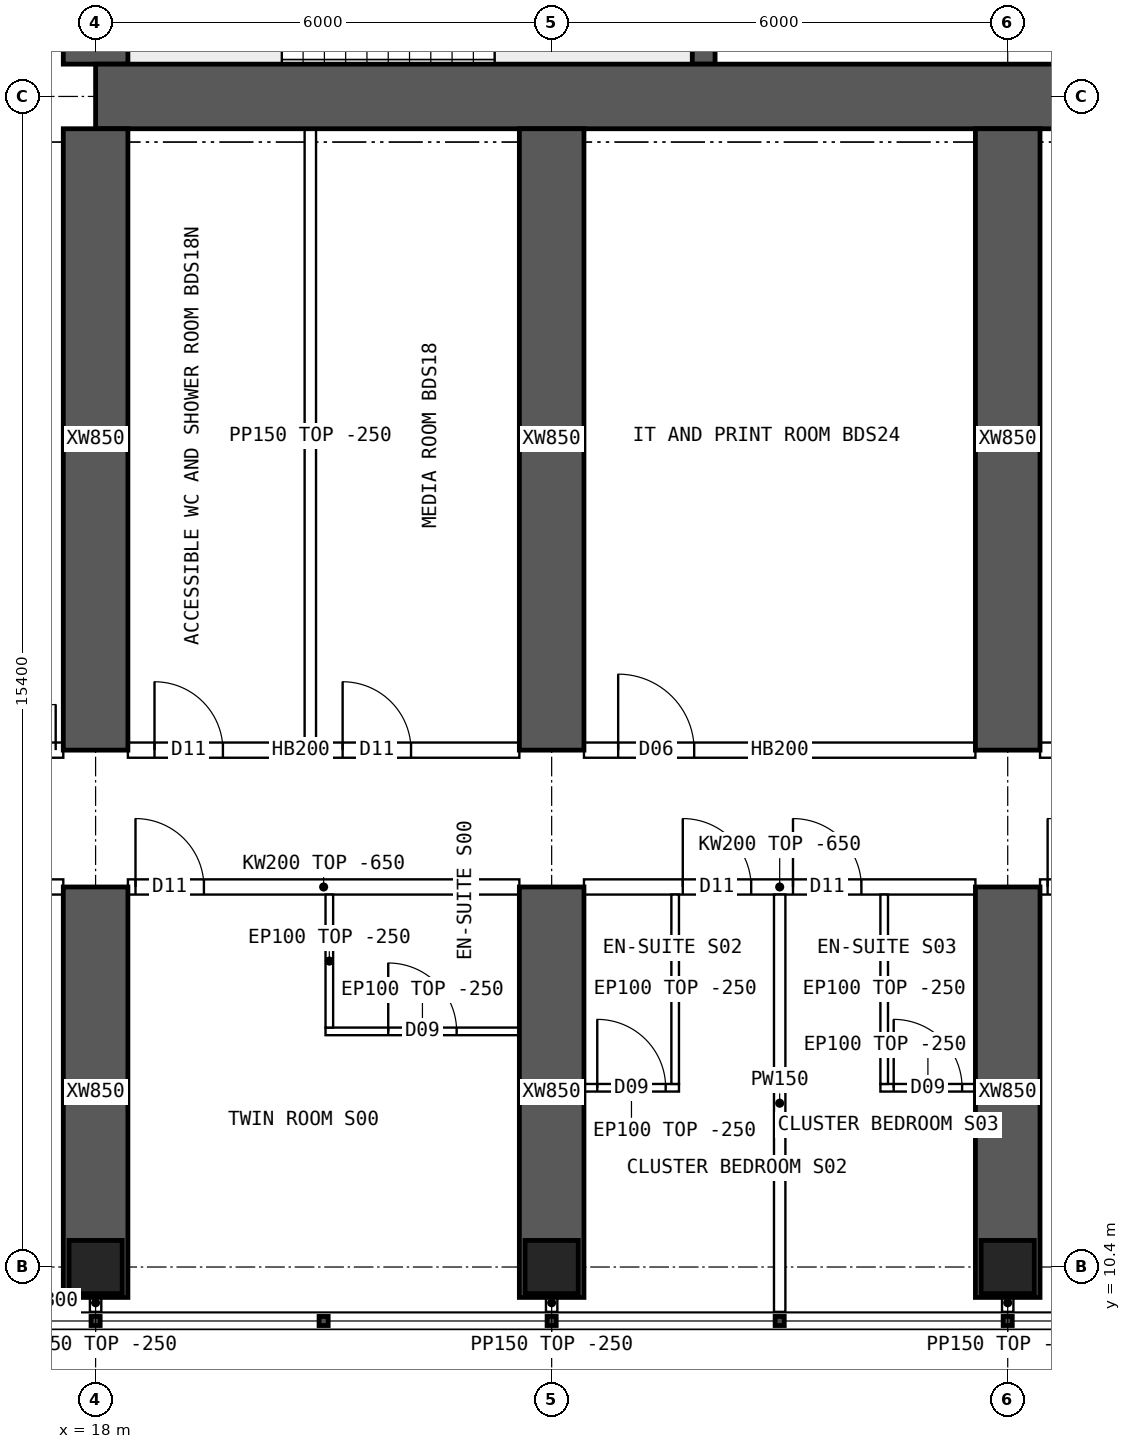
"""IFC4 building model, lengths in metres.
Left out: names, types, materials, properties, quantities, classifications, styles, units other than length and angle.
Written with IfcOpenShell. Run it as: python <this file> out.ifc"""

import sys

from ifc_helpers import new_model, si_unit, direction, frame, frame_2d, origin, origin_2d, place, context, subcontext, project, spatial, polyline, rectangle, hollow_rectangle, outline, extrude, element, fill, save


model = new_model("IFC4")
c1 = context("Model", 3, precision=1e-05, world=origin(), true_north=direction((0.0, 1.0)))
c2 = subcontext(c1, "Body", "Model", "MODEL_VIEW")
j1 = project(units=[si_unit("LENGTHUNIT", "METRE"), si_unit("PLANEANGLEUNIT", "RADIAN")], contexts=[c1])
p1 = place(None, origin())
s1 = spatial("IfcSite", under=j1, at=p1, CompositionType="ELEMENT")
p2 = place(p1, origin())
s2 = spatial("IfcBuilding", under=s1, at=p2, CompositionType="ELEMENT")
p3 = place(p2, frame((0.0, 0.0, 193.6)))
s3 = spatial("IfcBuildingStorey", under=s2, at=p3, CompositionType="ELEMENT", Elevation=193.6)
for number, where, z_axis, x_axis in (
    (1, (18.0, 10.4, 0.0), (0.0, 0.0, 1.0), (1.0, 0.0, 0.0)),
    (2, (24.0, 10.4, 0.0), (0.0, 0.0, 1.0), (1.0, 0.0, 0.0)),
    (3, (30.0, 10.4, 0.0), (0.0, 0.0, 1.0), (1.0, 0.0, 0.0)),
):
    element("IfcColumn", number, at=place(p3, frame(where, z_axis=z_axis, x_axis=x_axis)), inside=s3, PredefinedType="COLUMN", context=c2, shape_type="SweptSolid", body=[
        extrude(hollow_rectangle(XDim=0.7, YDim=0.7, WallThickness=0.07, at=origin_2d()), origin(), (0.0, 0.0, 1.0), 3.75),
    ])
p4 = place(p3, frame((18.0, 25.8, 0.0), z_axis=(0.0, 0.0, 1.0), x_axis=(1.0, 0.0, 0.0)))
e4 = element("IfcWall", 4, at=p4, inside=s3, PredefinedType="SHEAR", context=c2, shape_type="SweptSolid", body=[
    extrude(rectangle(XDim=48.0, YDim=0.85, at=frame_2d((24.0, 0.0))), origin(), (0.0, 0.0, 1.0), 3.75),
])
p5 = place(p3, frame((18.0, 26.225, 0.0), z_axis=(0.0, 0.0, 1.0), x_axis=(0.0, 1.0, 0.0)))
e5 = element("IfcWall", 5, at=p5, inside=s3, PredefinedType="SHEAR", context=c2, shape_type="SweptSolid", body=[
    extrude(rectangle(XDim=11.55, YDim=0.85, at=frame_2d((5.775, 0.0))), origin(), (0.0, 0.0, 1.0), 3.75),
])
p6 = place(p5, frame((5.075, 0.0, 0.0)))
e6 = element("IfcOpeningElement", 6, at=p6, cuts=e5, PredefinedType="OPENING", context=c2, shape_type="SweptSolid", body=[
    extrude(rectangle(XDim=1.2, YDim=2.1, at=frame_2d((0.6, 1.05))), frame((0.0, 0.435, 0.0), z_axis=(0.0, -1.0, 0.0), x_axis=(1.0, 0.0, 0.0)), (0.0, 0.0, 1.0), 0.87),
])
p7 = place(p3, frame((26.0, 26.225, 0.0), z_axis=(0.0, 0.0, 1.0), x_axis=(0.0, 1.0, 0.0)))
e7 = element("IfcWall", 7, at=p7, inside=s3, PredefinedType="SHEAR", context=c2, shape_type="SweptSolid", body=[
    extrude(rectangle(XDim=4.025, YDim=0.3, at=frame_2d((2.012, 0.0))), origin(), (0.0, 0.0, 1.0), 3.75),
])
p8 = place(p3, frame((18.0, 10.0, 0.0), z_axis=(0.0, 0.0, 1.0), x_axis=(0.0, 1.0, 0.0)))
e8 = element("IfcWall", 8, at=p8, inside=s3, PredefinedType="SHEAR", context=c2, shape_type="SweptSolid", body=[
    extrude(rectangle(XDim=5.4, YDim=0.85, at=frame_2d((2.7, 0.0))), origin(), (0.0, 0.0, 1.0), 3.75),
])
p9 = place(p3, frame((18.0, 17.2, 0.0), z_axis=(0.0, 0.0, 1.0), x_axis=(0.0, 1.0, 0.0)))
e9 = element("IfcWall", 9, at=p9, inside=s3, PredefinedType="SHEAR", context=c2, shape_type="SweptSolid", body=[
    extrude(rectangle(XDim=8.175, YDim=0.85, at=frame_2d((4.087, 0.0))), origin(), (0.0, 0.0, 1.0), 3.75),
])
p10 = place(p3, frame((24.0, 10.0, 0.0), z_axis=(0.0, 0.0, 1.0), x_axis=(0.0, 1.0, 0.0)))
e10 = element("IfcWall", 10, at=p10, inside=s3, PredefinedType="SHEAR", context=c2, shape_type="SweptSolid", body=[
    extrude(rectangle(XDim=5.4, YDim=0.85, at=frame_2d((2.7, 0.0))), origin(), (0.0, 0.0, 1.0), 3.75),
])
p11 = place(p3, frame((24.0, 17.2, 0.0), z_axis=(0.0, 0.0, 1.0), x_axis=(0.0, 1.0, 0.0)))
e11 = element("IfcWall", 11, at=p11, inside=s3, PredefinedType="SHEAR", context=c2, shape_type="SweptSolid", body=[
    extrude(rectangle(XDim=8.175, YDim=0.85, at=frame_2d((4.087, 0.0))), origin(), (0.0, 0.0, 1.0), 3.75),
])
p12 = place(p3, frame((30.0, 10.0, 0.0), z_axis=(0.0, 0.0, 1.0), x_axis=(0.0, 1.0, 0.0)))
e12 = element("IfcWall", 12, at=p12, inside=s3, PredefinedType="SHEAR", context=c2, shape_type="SweptSolid", body=[
    extrude(rectangle(XDim=5.4, YDim=0.85, at=frame_2d((2.7, 0.0))), origin(), (0.0, 0.0, 1.0), 3.75),
])
p13 = place(p3, frame((30.0, 17.2, 0.0), z_axis=(0.0, 0.0, 1.0), x_axis=(0.0, 1.0, 0.0)))
e13 = element("IfcWall", 13, at=p13, inside=s3, PredefinedType="SHEAR", context=c2, shape_type="SweptSolid", body=[
    extrude(rectangle(XDim=8.175, YDim=0.85, at=frame_2d((4.087, 0.0))), origin(), (0.0, 0.0, 1.0), 3.75),
])
p14 = place(p3, frame((17.2, 9.95, 0.0), z_axis=(0.0, 0.0, 1.0), x_axis=(1.0, 0.0, 0.0)))
e14 = element("IfcWall", 14, at=p14, inside=s3, PredefinedType="SOLIDWALL", context=c2, shape_type="SweptSolid", body=[
    extrude(rectangle(XDim=0.375, YDim=0.3, at=frame_2d((0.188, 0.0))), origin(), (0.0, 0.0, 1.0), 3.5),
])
p15 = place(p3, frame((15.6, 15.4, 0.0), z_axis=(0.0, 0.0, 1.0), x_axis=(1.0, 0.0, 0.0)))
e15 = element("IfcWall", 15, at=p15, inside=s3, PredefinedType="SOLIDWALL", context=c2, shape_type="SweptSolid", body=[
    extrude(rectangle(XDim=1.975, YDim=0.2, at=frame_2d((0.987, 0.0))), origin(), (0.0, 0.0, 1.0), 3.5),
])
p16 = place(p15, frame((0.875, 0.0, 0.0)))
e16 = element("IfcOpeningElement", 16, at=p16, cuts=e15, PredefinedType="OPENING", context=c2, shape_type="SweptSolid", body=[
    extrude(rectangle(XDim=0.9, YDim=2.1, at=frame_2d((0.45, 1.05))), frame((0.0, 0.11, 0.0), z_axis=(0.0, -1.0, 0.0), x_axis=(1.0, 0.0, 0.0)), (0.0, 0.0, 1.0), 0.22),
])
p17 = place(p3, frame((15.6, 17.2, 0.0), z_axis=(0.0, 0.0, 1.0), x_axis=(1.0, 0.0, 0.0)))
e17 = element("IfcWall", 17, at=p17, inside=s3, PredefinedType="SOLIDWALL", context=c2, shape_type="SweptSolid", body=[
    extrude(rectangle(XDim=1.975, YDim=0.2, at=frame_2d((0.987, 0.0))), origin(), (0.0, 0.0, 1.0), 3.5),
])
p18 = place(p17, frame((0.675, 0.0, 0.0)))
e18 = element("IfcOpeningElement", 18, at=p18, cuts=e17, PredefinedType="OPENING", context=c2, shape_type="SweptSolid", body=[
    extrude(rectangle(XDim=1.2, YDim=2.1, at=frame_2d((0.6, 1.05))), frame((0.0, 0.11, 0.0), z_axis=(0.0, -1.0, 0.0), x_axis=(1.0, 0.0, 0.0)), (0.0, 0.0, 1.0), 0.22),
])
p19 = place(p3, frame((18.425, 15.4, 0.0), z_axis=(0.0, 0.0, 1.0), x_axis=(1.0, 0.0, 0.0)))
e19 = element("IfcWall", 19, at=p19, inside=s3, PredefinedType="SOLIDWALL", context=c2, shape_type="SweptSolid", body=[
    extrude(outline(polyline([(0.0, 0.0), (5.15, 0.0), (5.15, 3.1), (0.0, 3.1), (0.0, 0.0)])), frame((0.0, 0.1, 0.0), z_axis=(0.0, -1.0, 0.0), x_axis=(1.0, 0.0, 0.0)), (0.0, 0.0, 1.0), 0.2),
])
p20 = place(p19, frame((0.1, 0.0, 0.0)))
e20 = element("IfcOpeningElement", 20, at=p20, cuts=e19, PredefinedType="OPENING", context=c2, shape_type="SweptSolid", body=[
    extrude(rectangle(XDim=0.9, YDim=2.1, at=frame_2d((0.45, 1.05))), frame((0.0, 0.11, 0.0), z_axis=(0.0, -1.0, 0.0), x_axis=(1.0, 0.0, 0.0)), (0.0, 0.0, 1.0), 0.22),
])
p21 = place(p3, frame((18.425, 17.2, 0.0), z_axis=(0.0, 0.0, 1.0), x_axis=(1.0, 0.0, 0.0)))
e21 = element("IfcWall", 21, at=p21, inside=s3, PredefinedType="SOLIDWALL", context=c2, shape_type="SweptSolid", body=[
    extrude(rectangle(XDim=5.15, YDim=0.2, at=frame_2d((2.575, 0.0))), origin(), (0.0, 0.0, 1.0), 3.5),
])
p22 = place(p21, frame((0.35, 0.0, 0.0)))
e22 = element("IfcOpeningElement", 22, at=p22, cuts=e21, PredefinedType="OPENING", context=c2, shape_type="SweptSolid", body=[
    extrude(rectangle(XDim=0.9, YDim=2.1, at=frame_2d((0.45, 1.05))), frame((0.0, 0.11, 0.0), z_axis=(0.0, -1.0, 0.0), x_axis=(1.0, 0.0, 0.0)), (0.0, 0.0, 1.0), 0.22),
])
p23 = place(p21, frame((2.825, 0.0, 0.0)))
e23 = element("IfcOpeningElement", 23, at=p23, cuts=e21, PredefinedType="OPENING", context=c2, shape_type="SweptSolid", body=[
    extrude(rectangle(XDim=0.9, YDim=2.1, at=frame_2d((0.45, 1.05))), frame((0.0, 0.11, 0.0), z_axis=(0.0, -1.0, 0.0), x_axis=(1.0, 0.0, 0.0)), (0.0, 0.0, 1.0), 0.22),
])
p24 = place(p3, frame((24.425, 15.4, 0.0), z_axis=(0.0, 0.0, 1.0), x_axis=(1.0, 0.0, 0.0)))
e24 = element("IfcWall", 24, at=p24, inside=s3, PredefinedType="SOLIDWALL", context=c2, shape_type="SweptSolid", body=[
    extrude(outline(polyline([(0.0, 0.0), (5.15, 0.0), (5.15, 3.1), (0.0, 3.1), (0.0, 0.0)])), frame((0.0, 0.1, 0.0), z_axis=(0.0, -1.0, 0.0), x_axis=(1.0, 0.0, 0.0)), (0.0, 0.0, 1.0), 0.2),
])
p25 = place(p24, frame((1.3, 0.0, 0.0)))
e25 = element("IfcOpeningElement", 25, at=p25, cuts=e24, PredefinedType="OPENING", context=c2, shape_type="SweptSolid", body=[
    extrude(rectangle(XDim=0.9, YDim=2.1, at=frame_2d((0.45, 1.05))), frame((0.0, 0.11, 0.0), z_axis=(0.0, -1.0, 0.0), x_axis=(1.0, 0.0, 0.0)), (0.0, 0.0, 1.0), 0.22),
])
p26 = place(p24, frame((2.75, 0.0, 0.0)))
e26 = element("IfcOpeningElement", 26, at=p26, cuts=e24, PredefinedType="OPENING", context=c2, shape_type="SweptSolid", body=[
    extrude(rectangle(XDim=0.9, YDim=2.1, at=frame_2d((0.45, 1.05))), frame((0.0, 0.11, 0.0), z_axis=(0.0, -1.0, 0.0), x_axis=(1.0, 0.0, 0.0)), (0.0, 0.0, 1.0), 0.22),
])
p27 = place(p3, frame((24.425, 17.2, 0.0), z_axis=(0.0, 0.0, 1.0), x_axis=(1.0, 0.0, 0.0)))
e27 = element("IfcWall", 27, at=p27, inside=s3, PredefinedType="SOLIDWALL", context=c2, shape_type="SweptSolid", body=[
    extrude(rectangle(XDim=5.15, YDim=0.2, at=frame_2d((2.575, 0.0))), origin(), (0.0, 0.0, 1.0), 3.5),
])
p28 = place(p27, frame((0.45, 0.0, 0.0)))
e28 = element("IfcOpeningElement", 28, at=p28, cuts=e27, PredefinedType="OPENING", context=c2, shape_type="SweptSolid", body=[
    extrude(rectangle(XDim=1.0, YDim=2.1, at=frame_2d((0.5, 1.05))), frame((0.0, 0.11, 0.0), z_axis=(0.0, -1.0, 0.0), x_axis=(1.0, 0.0, 0.0)), (0.0, 0.0, 1.0), 0.22),
])
p29 = place(p3, frame((30.425, 15.4, 0.0), z_axis=(0.0, 0.0, 1.0), x_axis=(1.0, 0.0, 0.0)))
e29 = element("IfcWall", 29, at=p29, inside=s3, PredefinedType="SOLIDWALL", context=c2, shape_type="SweptSolid", body=[
    extrude(outline(polyline([(0.0, 0.0), (5.15, 0.0), (5.15, 3.1), (0.0, 3.1), (0.0, 0.0)])), frame((0.0, 0.1, 0.0), z_axis=(0.0, -1.0, 0.0), x_axis=(1.0, 0.0, 0.0)), (0.0, 0.0, 1.0), 0.2),
])
p30 = place(p29, frame((0.1, 0.0, 0.0)))
e30 = element("IfcOpeningElement", 30, at=p30, cuts=e29, PredefinedType="OPENING", context=c2, shape_type="SweptSolid", body=[
    extrude(rectangle(XDim=0.9, YDim=2.1, at=frame_2d((0.45, 1.05))), frame((0.0, 0.11, 0.0), z_axis=(0.0, -1.0, 0.0), x_axis=(1.0, 0.0, 0.0)), (0.0, 0.0, 1.0), 0.22),
])
p31 = place(p3, frame((30.425, 17.2, 0.0), z_axis=(0.0, 0.0, 1.0), x_axis=(1.0, 0.0, 0.0)))
e31 = element("IfcWall", 31, at=p31, inside=s3, PredefinedType="SOLIDWALL", context=c2, shape_type="SweptSolid", body=[
    extrude(rectangle(XDim=5.15, YDim=0.2, at=frame_2d((2.575, 0.0))), origin(), (0.0, 0.0, 1.0), 3.5),
])
p32 = place(p31, frame((0.8, 0.0, 0.0)))
e32 = element("IfcOpeningElement", 32, at=p32, cuts=e31, PredefinedType="OPENING", context=c2, shape_type="SweptSolid", body=[
    extrude(rectangle(XDim=1.0, YDim=2.1, at=frame_2d((0.5, 1.05))), frame((0.0, 0.11, 0.0), z_axis=(0.0, -1.0, 0.0), x_axis=(1.0, 0.0, 0.0)), (0.0, 0.0, 1.0), 0.22),
])
p33 = place(p3, frame((23.575, 13.5, 0.0), z_axis=(0.0, 0.0, 1.0), x_axis=(-1.0, 0.0, 0.0)))
e33 = element("IfcWall", 33, at=p33, inside=s3, PredefinedType="PARTITIONING", context=c2, shape_type="SweptSolid", body=[
    extrude(rectangle(XDim=2.55, YDim=0.1, at=frame_2d((1.275, 0.0))), origin(), (0.0, 0.0, 1.0), 3.5),
])
p34 = place(p33, frame((0.825, 0.0, 0.0)))
e34 = element("IfcOpeningElement", 34, at=p34, cuts=e33, PredefinedType="OPENING", context=c2, shape_type="SweptSolid", body=[
    extrude(rectangle(XDim=0.9, YDim=2.1, at=frame_2d((0.45, 1.05))), frame((0.0, 0.06, 0.0), z_axis=(0.0, -1.0, 0.0), x_axis=(1.0, 0.0, 0.0)), (0.0, 0.0, 1.0), 0.12),
])
p35 = place(p3, frame((21.075, 13.55, 0.0), z_axis=(0.0, 0.0, 1.0), x_axis=(0.0, 1.0, 0.0)))
e35 = element("IfcWall", 35, at=p35, inside=s3, PredefinedType="PARTITIONING", context=c2, shape_type="SweptSolid", body=[
    extrude(outline(polyline([(0.0, 0.0), (1.75, 0.0), (1.75, 3.1), (1.702, 3.1), (1.7, 3.5), (0.0, 3.5), (0.0, 0.0)])), frame((0.0, 0.05, 0.0), z_axis=(0.0, -1.0, 0.0), x_axis=(1.0, 0.0, 0.0)), (0.0, 0.0, 1.0), 0.1),
])
p36 = place(p3, frame((27.0, 9.81, 0.0), z_axis=(0.0, 0.0, 1.0), x_axis=(0.0, 1.0, 0.0)))
e36 = element("IfcWall", 36, at=p36, inside=s3, PredefinedType="PARTITIONING", context=c2, shape_type="SweptSolid", body=[
    extrude(outline(polyline([(0.0, 0.0), (5.49, 0.0), (5.49, 3.1), (5.442, 3.1), (5.44, 3.5), (0.792, 3.5), (0.79, 3.1), (0.392, 3.1), (0.39, 3.5), (0.0, 3.5), (0.0, 0.0)])), frame((0.0, 0.075, 0.0), z_axis=(0.0, -1.0, 0.0), x_axis=(1.0, 0.0, 0.0)), (0.0, 0.0, 1.0), 0.15),
])
p37 = place(p3, frame((25.675, 12.758, 0.0), z_axis=(0.0, 0.0, 1.0), x_axis=(-1.0, 0.0, 0.0)))
e37 = element("IfcWall", 37, at=p37, inside=s3, PredefinedType="PARTITIONING", context=c2, shape_type="SweptSolid", body=[
    extrude(rectangle(XDim=1.25, YDim=0.1, at=frame_2d((0.625, 0.0))), origin(), (0.0, 0.0, 1.0), 3.5),
])
p38 = place(p37, frame((0.175, 0.0, 0.0)))
e38 = element("IfcOpeningElement", 38, at=p38, cuts=e37, PredefinedType="OPENING", context=c2, shape_type="SweptSolid", body=[
    extrude(rectangle(XDim=0.9, YDim=2.1, at=frame_2d((0.45, 1.05))), frame((0.0, 0.06, 0.0), z_axis=(0.0, -1.0, 0.0), x_axis=(1.0, 0.0, 0.0)), (0.0, 0.0, 1.0), 0.12),
])
p39 = place(p3, frame((25.625, 12.808, 0.0), z_axis=(0.0, 0.0, 1.0), x_axis=(0.0, 1.0, 0.0)))
e39 = element("IfcWall", 39, at=p39, inside=s3, PredefinedType="PARTITIONING", context=c2, shape_type="SweptSolid", body=[
    extrude(outline(polyline([(0.0, 0.0), (2.492, 0.0), (2.492, 3.1), (2.444, 3.1), (2.442, 3.5), (0.0, 3.5), (0.0, 0.0)])), frame((0.0, 0.05, 0.0), z_axis=(0.0, -1.0, 0.0), x_axis=(1.0, 0.0, 0.0)), (0.0, 0.0, 1.0), 0.1),
])
p40 = place(p3, frame((29.575, 12.758, 0.0), z_axis=(0.0, 0.0, 1.0), x_axis=(-1.0, 0.0, 0.0)))
e40 = element("IfcWall", 40, at=p40, inside=s3, PredefinedType="PARTITIONING", context=c2, shape_type="SweptSolid", body=[
    extrude(rectangle(XDim=1.25, YDim=0.1, at=frame_2d((0.625, 0.0))), origin(), (0.0, 0.0, 1.0), 3.5),
])
p41 = place(p40, frame((0.175, 0.0, 0.0)))
e41 = element("IfcOpeningElement", 41, at=p41, cuts=e40, PredefinedType="OPENING", context=c2, shape_type="SweptSolid", body=[
    extrude(rectangle(XDim=0.9, YDim=2.1, at=frame_2d((0.45, 1.05))), frame((0.0, 0.06, 0.0), z_axis=(0.0, -1.0, 0.0), x_axis=(1.0, 0.0, 0.0)), (0.0, 0.0, 1.0), 0.12),
])
p42 = place(p3, frame((28.375, 12.808, 0.0), z_axis=(0.0, 0.0, 1.0), x_axis=(0.0, 1.0, 0.0)))
e42 = element("IfcWall", 42, at=p42, inside=s3, PredefinedType="PARTITIONING", context=c2, shape_type="SweptSolid", body=[
    extrude(outline(polyline([(0.0, 0.0), (2.492, 0.0), (2.492, 3.1), (2.444, 3.1), (2.442, 3.5), (0.0, 3.5), (0.0, 0.0)])), frame((0.0, 0.05, 0.0), z_axis=(0.0, -1.0, 0.0), x_axis=(1.0, 0.0, 0.0)), (0.0, 0.0, 1.0), 0.1),
])
p43 = place(p3, frame((20.825, 17.3, 0.0), z_axis=(0.0, 0.0, 1.0), x_axis=(0.0, 1.0, 0.0)))
e43 = element("IfcWall", 43, at=p43, inside=s3, PredefinedType="PARTITIONING", context=c2, shape_type="SweptSolid", body=[
    extrude(rectangle(XDim=8.075, YDim=0.15, at=frame_2d((4.038, 0.0))), origin(), (0.0, 0.0, 1.0), 3.5),
])
for number, where, z_axis, x_axis in (
    (44, (18.0, 10.05, 0.0), (0.0, 0.0, 1.0), (0.0, -1.0, 0.0)),
    (45, (24.0, 10.05, 0.0), (0.0, 0.0, 1.0), (0.0, -1.0, 0.0)),
    (46, (30.0, 10.05, 0.0), (0.0, 0.0, 1.0), (0.0, -1.0, 0.0)),
):
    element("IfcWall", number, at=place(p3, frame(where, z_axis=z_axis, x_axis=x_axis)), inside=s3, PredefinedType="PARTITIONING", context=c2, shape_type="SweptSolid", body=[
        extrude(rectangle(XDim=0.24, YDim=0.15, at=frame_2d((0.12, 0.0))), origin(), (0.0, 0.0, 1.0), 3.5),
    ])
p44 = place(p18, origin())
e47 = element("IfcDoor", 47, at=p44, inside=s3, OperationType="DOUBLE_DOOR_SINGLE_SWING", PredefinedType="DOOR", context=c2, shape_type="SweptSolid", body=[
    extrude(rectangle(XDim=1.2, YDim=2.1, at=frame_2d((0.6, 1.05))), frame((0.0, 0.025, 0.0), z_axis=(0.0, -1.0, 0.0), x_axis=(1.0, 0.0, 0.0)), (0.0, 0.0, 1.0), 0.05),
])
fill(e18, e47)
p45 = place(p34, origin())
e48 = element("IfcDoor", 48, at=p45, inside=s3, OperationType="SINGLE_SWING_RIGHT", PredefinedType="DOOR", context=c2, shape_type="SweptSolid", body=[
    extrude(rectangle(XDim=0.9, YDim=2.1, at=frame_2d((0.45, 1.05))), frame((0.0, 0.025, 0.0), z_axis=(0.0, -1.0, 0.0), x_axis=(1.0, 0.0, 0.0)), (0.0, 0.0, 1.0), 0.05),
])
fill(e34, e48)
p46 = place(p20, origin())
e49 = element("IfcDoor", 49, at=p46, inside=s3, OperationType="SINGLE_SWING_LEFT", PredefinedType="DOOR", context=c2, shape_type="SweptSolid", body=[
    extrude(rectangle(XDim=0.9, YDim=2.1, at=frame_2d((0.45, 1.05))), frame((0.0, 0.025, 0.0), z_axis=(0.0, -1.0, 0.0), x_axis=(1.0, 0.0, 0.0)), (0.0, 0.0, 1.0), 0.05),
])
fill(e20, e49)
p47 = place(p38, origin())
e50 = element("IfcDoor", 50, at=p47, inside=s3, OperationType="SINGLE_SWING_RIGHT", PredefinedType="DOOR", context=c2, shape_type="SweptSolid", body=[
    extrude(rectangle(XDim=0.9, YDim=2.1, at=frame_2d((0.45, 1.05))), frame((0.0, 0.025, 0.0), z_axis=(0.0, -1.0, 0.0), x_axis=(1.0, 0.0, 0.0)), (0.0, 0.0, 1.0), 0.05),
])
fill(e38, e50)
p48 = place(p25, origin())
e51 = element("IfcDoor", 51, at=p48, inside=s3, OperationType="SINGLE_SWING_LEFT", PredefinedType="DOOR", context=c2, shape_type="SweptSolid", body=[
    extrude(rectangle(XDim=0.9, YDim=2.1, at=frame_2d((0.45, 1.05))), frame((0.0, 0.025, 0.0), z_axis=(0.0, -1.0, 0.0), x_axis=(1.0, 0.0, 0.0)), (0.0, 0.0, 1.0), 0.05),
])
fill(e25, e51)
p49 = place(p41, origin())
e52 = element("IfcDoor", 52, at=p49, inside=s3, OperationType="SINGLE_SWING_RIGHT", PredefinedType="DOOR", context=c2, shape_type="SweptSolid", body=[
    extrude(rectangle(XDim=0.9, YDim=2.1, at=frame_2d((0.45, 1.05))), frame((0.0, 0.025, 0.0), z_axis=(0.0, -1.0, 0.0), x_axis=(1.0, 0.0, 0.0)), (0.0, 0.0, 1.0), 0.05),
])
fill(e41, e52)
p50 = place(p26, origin())
e53 = element("IfcDoor", 53, at=p50, inside=s3, OperationType="SINGLE_SWING_LEFT", PredefinedType="DOOR", context=c2, shape_type="SweptSolid", body=[
    extrude(rectangle(XDim=0.9, YDim=2.1, at=frame_2d((0.45, 1.05))), frame((0.0, 0.025, 0.0), z_axis=(0.0, -1.0, 0.0), x_axis=(1.0, 0.0, 0.0)), (0.0, 0.0, 1.0), 0.05),
])
fill(e26, e53)
p51 = place(p30, origin())
e54 = element("IfcDoor", 54, at=p51, inside=s3, OperationType="SINGLE_SWING_LEFT", PredefinedType="DOOR", context=c2, shape_type="SweptSolid", body=[
    extrude(rectangle(XDim=0.9, YDim=2.1, at=frame_2d((0.45, 1.05))), frame((0.0, 0.025, 0.0), z_axis=(0.0, -1.0, 0.0), x_axis=(1.0, 0.0, 0.0)), (0.0, 0.0, 1.0), 0.05),
])
fill(e30, e54)
p52 = place(p22, origin())
e55 = element("IfcDoor", 55, at=p52, inside=s3, OperationType="SINGLE_SWING_LEFT", PredefinedType="DOOR", context=c2, shape_type="SweptSolid", body=[
    extrude(rectangle(XDim=0.9, YDim=2.1, at=frame_2d((0.45, 1.05))), frame((0.0, 0.025, 0.0), z_axis=(0.0, -1.0, 0.0), x_axis=(1.0, 0.0, 0.0)), (0.0, 0.0, 1.0), 0.05),
])
fill(e22, e55)
p53 = place(p23, origin())
e56 = element("IfcDoor", 56, at=p53, inside=s3, OperationType="SINGLE_SWING_LEFT", PredefinedType="DOOR", context=c2, shape_type="SweptSolid", body=[
    extrude(rectangle(XDim=0.9, YDim=2.1, at=frame_2d((0.45, 1.05))), frame((0.0, 0.025, 0.0), z_axis=(0.0, -1.0, 0.0), x_axis=(1.0, 0.0, 0.0)), (0.0, 0.0, 1.0), 0.05),
])
fill(e23, e56)
p54 = place(p28, origin())
e57 = element("IfcDoor", 57, at=p54, inside=s3, OperationType="SINGLE_SWING_LEFT", PredefinedType="DOOR", context=c2, shape_type="SweptSolid", body=[
    extrude(rectangle(XDim=1.0, YDim=2.1, at=frame_2d((0.5, 1.05))), frame((0.0, 0.025, 0.0), z_axis=(0.0, -1.0, 0.0), x_axis=(1.0, 0.0, 0.0)), (0.0, 0.0, 1.0), 0.05),
])
fill(e28, e57)
save(model, sys.argv[1])
